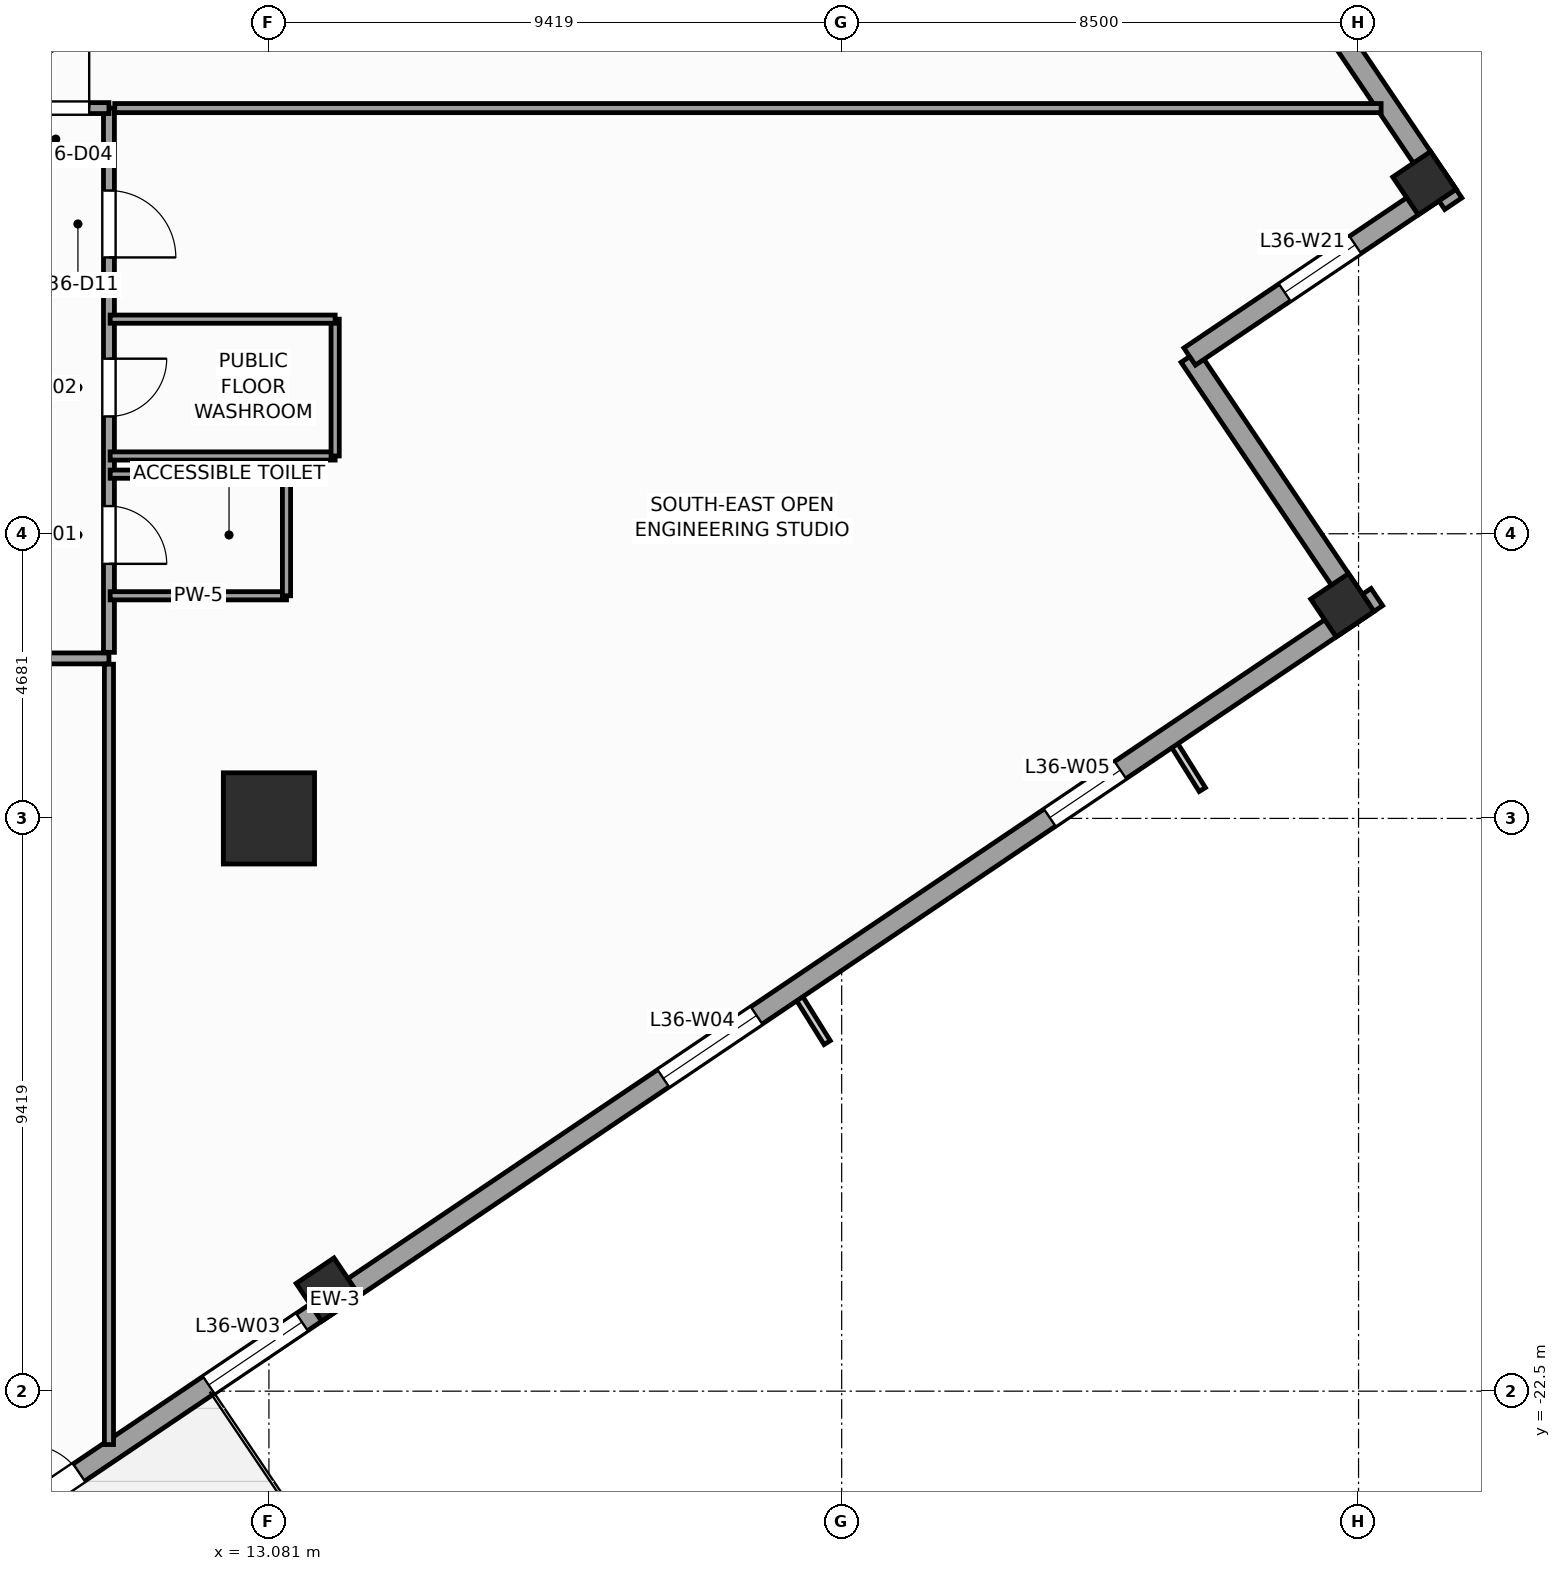
"""IFC4 building model, lengths in metres.
Left out: names, types, materials, properties, quantities, classifications, styles, units other than length and angle.
Written with IfcOpenShell. Run it as: python <this file> out.ifc"""

import sys

from ifc_helpers import new_model, si_unit, direction, frame, frame_2d, origin, origin_2d, place, context, subcontext, project, spatial, rectangle, extrude, source, transform, mapped, element, fill, save


model = new_model("IFC4")
c1 = context("Model", 3, precision=1e-05, world=origin(), true_north=direction((0.0, 1.0)))
c2 = subcontext(c1, "Body", "Model", "MODEL_VIEW")
j1 = project(units=[si_unit("LENGTHUNIT", "METRE"), si_unit("PLANEANGLEUNIT", "RADIAN")], contexts=[c1])
p1 = place(None, origin())
s1 = spatial("IfcSite", under=j1, at=p1, CompositionType="ELEMENT")
p2 = place(p1, origin())
s2 = spatial("IfcBuilding", under=s1, at=p2, CompositionType="ELEMENT")
p3 = place(p2, frame((0.0, 0.0, 152.4)))
s3 = spatial("IfcBuildingStorey", under=s2, at=p3, CompositionType="ELEMENT", Elevation=152.4)
m1 = source(origin(), c2, "Body", "SweptSolid", [
    extrude(rectangle(XDim=1.5, YDim=1.5, at=origin_2d()), origin(), (0.0, 0.0, 1.0), 4.0),
])
p4 = place(p3, frame((13.081, -13.081, 0.0), z_axis=(0.0, 0.0, 1.0), x_axis=(1.0, 0.0, 0.0)))
e1 = element("IfcColumn", 1, at=p4, inside=s3, PredefinedType="COLUMN", context=c2, shape_type="MappedRepresentation", body=[
    mapped(m1, transform((0.0, 0.0, 0.0), scale=1.0)),
])
m2 = source(origin(), c2, "Body", "SweptSolid", [
    extrude(rectangle(XDim=0.75, YDim=0.75, at=origin_2d()), origin(), (0.0, 0.0, 1.0), 4.0),
])
for number, where, z_axis, x_axis in (
    (2, (14.05, -20.83, 0.0), (0.0, 0.0, 1.0), (0.829, 0.559, 0.0)),
    (3, (30.734, -9.576, 0.0), (0.0, 0.0, 1.0), (0.829, 0.559, 0.0)),
    (4, (32.083, -2.635, 0.0), (0.0, 0.0, 1.0), (0.829, 0.559, 0.0)),
):
    element("IfcColumn", number, at=place(p3, frame(where, z_axis=z_axis, x_axis=x_axis)), inside=s3, PredefinedType="COLUMN", context=c2, shape_type="MappedRepresentation", body=[
        mapped(m2, transform((0.0, 0.0, 0.0), scale=1.0)),
    ])
p5 = place(p3, frame((-2.972, -32.558, 0.0), z_axis=(0.0, 0.0, 1.0), x_axis=(0.829036218961, 0.559194910251, 0.0)))
e5 = element("IfcWall", 5, at=p5, inside=s3, PredefinedType="STANDARD", context=c2, shape_type="SweptSolid", body=[
    extrude(rectangle(XDim=41.34, YDim=0.34, at=frame_2d((20.67, 0.0))), origin(), (0.0, 0.0, 1.0), 3.04),
])
p6 = place(p5, frame((14.545, 0.0, 0.0)))
e6 = element("IfcOpeningElement", 6, at=p6, cuts=e5, PredefinedType="OPENING", context=c2, shape_type="SweptSolid", body=[
    extrude(rectangle(XDim=1.05, YDim=2.25, at=frame_2d((0.525, 1.125))), frame((0.0, 0.18, 0.0), z_axis=(0.0, -1.0, 0.0), x_axis=(1.0, 0.0, 0.0)), (0.0, 0.0, 1.0), 0.36),
])
p7 = place(p5, frame((4.261, 0.0, 0.56)))
e7 = element("IfcOpeningElement", 7, at=p7, cuts=e5, PredefinedType="OPENING", context=c2, shape_type="SweptSolid", body=[
    extrude(rectangle(XDim=1.4, YDim=2.4, at=frame_2d((0.7, 1.2))), frame((0.0, 0.18, 0.0), z_axis=(0.0, -1.0, 0.0), x_axis=(1.0, 0.0, 0.0)), (0.0, 0.0, 1.0), 0.36),
])
p8 = place(p5, frame((11.064, 0.0, 0.61)))
e8 = element("IfcOpeningElement", 8, at=p8, cuts=e5, PredefinedType="OPENING", context=c2, shape_type="SweptSolid", body=[
    extrude(rectangle(XDim=1.85, YDim=2.35, at=frame_2d((0.925, 1.175))), frame((0.0, 0.18, 0.0), z_axis=(0.0, -1.0, 0.0), x_axis=(1.0, 0.0, 0.0)), (0.0, 0.0, 1.0), 0.36),
])
p9 = place(p5, frame((18.168, 0.0, 0.61)))
e9 = element("IfcOpeningElement", 9, at=p9, cuts=e5, PredefinedType="OPENING", context=c2, shape_type="SweptSolid", body=[
    extrude(rectangle(XDim=1.85, YDim=2.35, at=frame_2d((0.925, 1.175))), frame((0.0, 0.18, 0.0), z_axis=(0.0, -1.0, 0.0), x_axis=(1.0, 0.0, 0.0)), (0.0, 0.0, 1.0), 0.36),
])
p10 = place(p5, frame((27.186, 0.0, 0.61)))
e10 = element("IfcOpeningElement", 10, at=p10, cuts=e5, PredefinedType="OPENING", context=c2, shape_type="SweptSolid", body=[
    extrude(rectangle(XDim=1.85, YDim=2.35, at=frame_2d((0.925, 1.175))), frame((0.0, 0.18, 0.0), z_axis=(0.0, -1.0, 0.0), x_axis=(1.0, 0.0, 0.0)), (0.0, 0.0, 1.0), 0.36),
])
p11 = place(p5, frame((34.852, 0.0, 0.56)))
e11 = element("IfcOpeningElement", 11, at=p11, cuts=e5, PredefinedType="OPENING", context=c2, shape_type="SweptSolid", body=[
    extrude(rectangle(XDim=1.4, YDim=2.4, at=frame_2d((0.7, 1.2))), frame((0.0, 0.18, 0.0), z_axis=(0.0, -1.0, 0.0), x_axis=(1.0, 0.0, 0.0)), (0.0, 0.0, 1.0), 0.36),
])
p12 = place(p3, frame((31.019, -9.631, 0.0), z_axis=(0.0, 0.0, 1.0), x_axis=(-0.559210350234, 0.829025804298, 0.0)))
e12 = element("IfcWall", 12, at=p12, inside=s3, PredefinedType="STANDARD", context=c2, shape_type="SweptSolid", body=[
    extrude(rectangle(XDim=5.0, YDim=0.34, at=frame_2d((2.5, 0.0))), origin(), (0.0, 0.0, 1.0), 3.74),
])
p13 = place(p3, frame((28.223, -5.486, 0.0), z_axis=(0.0, 0.0, 1.0), x_axis=(0.82905227345, 0.559171107879, 0.0)))
e13 = element("IfcWall", 13, at=p13, inside=s3, PredefinedType="STANDARD", context=c2, shape_type="SweptSolid", body=[
    extrude(rectangle(XDim=5.17, YDim=0.34, at=frame_2d((2.585, 0.0))), origin(), (0.0, 0.0, 1.0), 3.04),
])
p14 = place(p13, frame((1.885, 0.0, 0.56)))
e14 = element("IfcOpeningElement", 14, at=p14, cuts=e13, PredefinedType="OPENING", context=c2, shape_type="SweptSolid", body=[
    extrude(rectangle(XDim=1.4, YDim=2.4, at=frame_2d((0.7, 1.2))), frame((0.0, 0.18, 0.0), z_axis=(0.0, -1.0, 0.0), x_axis=(1.0, 0.0, 0.0)), (0.0, 0.0, 1.0), 0.36),
])
p15 = place(p3, frame((32.558, -2.972, 0.0), z_axis=(0.0, 0.0, 1.0), x_axis=(-0.559194910251, 0.829036218961, 0.0)))
e15 = element("IfcWall", 15, at=p15, inside=s3, PredefinedType="STANDARD", context=c2, shape_type="SweptSolid", body=[
    extrude(rectangle(XDim=41.34, YDim=0.34, at=frame_2d((20.67, 0.0))), origin(), (0.0, 0.0, 1.0), 3.04),
])
p16 = place(p15, frame((4.261, 0.0, 0.56)))
e16 = element("IfcOpeningElement", 16, at=p16, cuts=e15, PredefinedType="OPENING", context=c2, shape_type="SweptSolid", body=[
    extrude(rectangle(XDim=1.4, YDim=2.4, at=frame_2d((0.7, 1.2))), frame((0.0, 0.18, 0.0), z_axis=(0.0, -1.0, 0.0), x_axis=(1.0, 0.0, 0.0)), (0.0, 0.0, 1.0), 0.36),
])
p17 = place(p15, frame((11.064, 0.0, 0.61)))
e17 = element("IfcOpeningElement", 17, at=p17, cuts=e15, PredefinedType="OPENING", context=c2, shape_type="SweptSolid", body=[
    extrude(rectangle(XDim=1.85, YDim=2.35, at=frame_2d((0.925, 1.175))), frame((0.0, 0.18, 0.0), z_axis=(0.0, -1.0, 0.0), x_axis=(1.0, 0.0, 0.0)), (0.0, 0.0, 1.0), 0.36),
])
p18 = place(p15, frame((18.168, 0.0, 0.61)))
e18 = element("IfcOpeningElement", 18, at=p18, cuts=e15, PredefinedType="OPENING", context=c2, shape_type="SweptSolid", body=[
    extrude(rectangle(XDim=1.85, YDim=2.35, at=frame_2d((0.925, 1.175))), frame((0.0, 0.18, 0.0), z_axis=(0.0, -1.0, 0.0), x_axis=(1.0, 0.0, 0.0)), (0.0, 0.0, 1.0), 0.36),
])
p19 = place(p15, frame((27.186, 0.0, 0.61)))
e19 = element("IfcOpeningElement", 19, at=p19, cuts=e15, PredefinedType="OPENING", context=c2, shape_type="SweptSolid", body=[
    extrude(rectangle(XDim=1.85, YDim=2.35, at=frame_2d((0.925, 1.175))), frame((0.0, 0.18, 0.0), z_axis=(0.0, -1.0, 0.0), x_axis=(1.0, 0.0, 0.0)), (0.0, 0.0, 1.0), 0.36),
])
p20 = place(p15, frame((34.852, 0.0, 0.56)))
e20 = element("IfcOpeningElement", 20, at=p20, cuts=e15, PredefinedType="OPENING", context=c2, shape_type="SweptSolid", body=[
    extrude(rectangle(XDim=1.4, YDim=2.4, at=frame_2d((0.7, 1.2))), frame((0.0, 0.18, 0.0), z_axis=(0.0, -1.0, 0.0), x_axis=(1.0, 0.0, 0.0)), (0.0, 0.0, 1.0), 0.36),
])
p21 = place(p3, frame((-10.45, -10.45, 0.0), z_axis=(0.0, 0.0, 1.0), x_axis=(1.0, 0.0, 0.0)))
e21 = element("IfcWall", 21, at=p21, inside=s3, PredefinedType="PARTITIONING", context=c2, shape_type="SweptSolid", body=[
    extrude(rectangle(XDim=20.9, YDim=0.18, at=frame_2d((10.45, 0.0))), origin(), (0.0, 0.0, 1.0), 3.74),
])
p22 = place(p21, frame((2.339, 0.0, 0.0)))
e22 = element("IfcOpeningElement", 22, at=p22, cuts=e21, PredefinedType="OPENING", context=c2, shape_type="SweptSolid", body=[
    extrude(rectangle(XDim=1.1, YDim=2.2, at=frame_2d((0.55, 1.1))), frame((0.0, 0.1, 0.0), z_axis=(0.0, -1.0, 0.0), x_axis=(1.0, 0.0, 0.0)), (0.0, 0.0, 1.0), 0.2),
])
p23 = place(p21, frame((7.4, 0.0, 0.0)))
e23 = element("IfcOpeningElement", 23, at=p23, cuts=e21, PredefinedType="OPENING", context=c2, shape_type="SweptSolid", body=[
    extrude(rectangle(XDim=1.1, YDim=2.2, at=frame_2d((0.55, 1.1))), frame((0.0, 0.1, 0.0), z_axis=(0.0, -1.0, 0.0), x_axis=(1.0, 0.0, 0.0)), (0.0, 0.0, 1.0), 0.2),
])
p24 = place(p21, frame((12.4, 0.0, 0.0)))
e24 = element("IfcOpeningElement", 24, at=p24, cuts=e21, PredefinedType="OPENING", context=c2, shape_type="SweptSolid", body=[
    extrude(rectangle(XDim=1.1, YDim=2.2, at=frame_2d((0.55, 1.1))), frame((0.0, 0.1, 0.0), z_axis=(0.0, -1.0, 0.0), x_axis=(1.0, 0.0, 0.0)), (0.0, 0.0, 1.0), 0.2),
])
p25 = place(p21, frame((17.46, 0.0, 0.0)))
e25 = element("IfcOpeningElement", 25, at=p25, cuts=e21, PredefinedType="OPENING", context=c2, shape_type="SweptSolid", body=[
    extrude(rectangle(XDim=1.1, YDim=2.2, at=frame_2d((0.55, 1.1))), frame((0.0, 0.1, 0.0), z_axis=(0.0, -1.0, 0.0), x_axis=(1.0, 0.0, 0.0)), (0.0, 0.0, 1.0), 0.2),
])
p26 = place(p3, frame((10.45, -10.35, 0.0), z_axis=(0.0, 0.0, 1.0), x_axis=(0.0, 1.0, 0.0)))
e26 = element("IfcWall", 26, at=p26, inside=s3, PredefinedType="PARTITIONING", context=c2, shape_type="SweptSolid", body=[
    extrude(rectangle(XDim=8.95, YDim=0.18, at=frame_2d((4.475, 0.0))), origin(), (0.0, 0.0, 1.0), 3.74),
])
p27 = place(p26, frame((1.455, 0.0, 0.0)))
e27 = element("IfcOpeningElement", 27, at=p27, cuts=e26, PredefinedType="OPENING", context=c2, shape_type="SweptSolid", body=[
    extrude(rectangle(XDim=0.95, YDim=2.1, at=frame_2d((0.475, 1.05))), frame((0.0, 0.1, 0.0), z_axis=(0.0, -1.0, 0.0), x_axis=(1.0, 0.0, 0.0)), (0.0, 0.0, 1.0), 0.2),
])
p28 = place(p26, frame((3.879, 0.0, 0.0)))
e28 = element("IfcOpeningElement", 28, at=p28, cuts=e26, PredefinedType="OPENING", context=c2, shape_type="SweptSolid", body=[
    extrude(rectangle(XDim=0.95, YDim=2.1, at=frame_2d((0.475, 1.05))), frame((0.0, 0.1, 0.0), z_axis=(0.0, -1.0, 0.0), x_axis=(1.0, 0.0, 0.0)), (0.0, 0.0, 1.0), 0.2),
])
p29 = place(p26, frame((6.494, 0.0, 0.0)))
e29 = element("IfcOpeningElement", 29, at=p29, cuts=e26, PredefinedType="OPENING", context=c2, shape_type="SweptSolid", body=[
    extrude(rectangle(XDim=1.1, YDim=2.2, at=frame_2d((0.55, 1.1))), frame((0.0, 0.1, 0.0), z_axis=(0.0, -1.0, 0.0), x_axis=(1.0, 0.0, 0.0)), (0.0, 0.0, 1.0), 0.2),
])
p30 = place(p3, frame((8.7, -1.4, 0.0), z_axis=(0.0, 0.0, 1.0), x_axis=(1.0, 0.0, 0.0)))
e30 = element("IfcWall", 30, at=p30, inside=s3, PredefinedType="PARTITIONING", context=c2, shape_type="SweptSolid", body=[
    extrude(rectangle(XDim=1.75, YDim=0.18, at=frame_2d((0.875, 0.0))), origin(), (0.0, 0.0, 1.0), 3.74),
])
p31 = place(p30, frame((0.325, 0.0, 0.0)))
e31 = element("IfcOpeningElement", 31, at=p31, cuts=e30, PredefinedType="OPENING", context=c2, shape_type="SweptSolid", body=[
    extrude(rectangle(XDim=1.1, YDim=2.2, at=frame_2d((0.55, 1.1))), frame((0.0, 0.1, 0.0), z_axis=(0.0, -1.0, 0.0), x_axis=(1.0, 0.0, 0.0)), (0.0, 0.0, 1.0), 0.2),
])
p32 = place(p3, frame((10.545, -1.4, 0.0), z_axis=(0.0, 0.0, 1.0), x_axis=(1.0, 0.0, 0.0)))
e32 = element("IfcWall", 32, at=p32, inside=s3, PredefinedType="PARTITIONING", context=c2, shape_type="SweptSolid", body=[
    extrude(rectangle(XDim=20.826, YDim=0.15, at=frame_2d((10.413, 0.0))), origin(), (0.0, 0.0, 1.0), 3.74),
])
p33 = place(p3, frame((10.45, -23.378, 0.0), z_axis=(0.0, 0.0, 1.0), x_axis=(0.0, 1.0, 0.0)))
e33 = element("IfcWall", 33, at=p33, inside=s3, PredefinedType="PARTITIONING", context=c2, shape_type="SweptSolid", body=[
    extrude(rectangle(XDim=12.833, YDim=0.15, at=frame_2d((6.417, 0.0))), origin(), (0.0, 0.0, 1.0), 3.74),
])
p34 = place(p3, frame((10.47, -9.42, 0.0), z_axis=(0.0, 0.0, 1.0), x_axis=(1.0, 0.0, 0.0)))
e34 = element("IfcWall", 34, at=p34, inside=s3, PredefinedType="PARTITIONING", context=c2, shape_type="SweptSolid", body=[
    extrude(rectangle(XDim=2.9, YDim=0.135, at=frame_2d((1.45, 0.0))), origin(), (0.0, 0.0, 1.0), 3.74),
])
p35 = place(p3, frame((13.37, -9.42, 0.0), z_axis=(0.0, 0.0, 1.0), x_axis=(0.0, 1.0, 0.0)))
e35 = element("IfcWall", 35, at=p35, inside=s3, PredefinedType="PARTITIONING", context=c2, shape_type="SweptSolid", body=[
    extrude(rectangle(XDim=2.0, YDim=0.135, at=frame_2d((1.0, 0.0))), origin(), (0.0, 0.0, 1.0), 2.84),
])
p36 = place(p3, frame((10.47, -7.42, 0.0), z_axis=(0.0, 0.0, 1.0), x_axis=(1.0, 0.0, 0.0)))
e36 = element("IfcWall", 36, at=p36, inside=s3, PredefinedType="PARTITIONING", context=c2, shape_type="SweptSolid", body=[
    extrude(rectangle(XDim=2.9, YDim=0.135, at=frame_2d((1.45, 0.0))), origin(), (0.0, 0.0, 1.0), 3.74),
])
p37 = place(p3, frame((10.47, -7.121, 0.0), z_axis=(0.0, 0.0, 1.0), x_axis=(1.0, 0.0, 0.0)))
e37 = element("IfcWall", 37, at=p37, inside=s3, PredefinedType="PARTITIONING", context=c2, shape_type="SweptSolid", body=[
    extrude(rectangle(XDim=3.7, YDim=0.135, at=frame_2d((1.85, 0.0))), origin(), (0.0, 0.0, 1.0), 3.74),
])
p38 = place(p3, frame((14.17, -7.121, 0.0), z_axis=(0.0, 0.0, 1.0), x_axis=(0.0, 1.0, 0.0)))
e38 = element("IfcWall", 38, at=p38, inside=s3, PredefinedType="PARTITIONING", context=c2, shape_type="SweptSolid", body=[
    extrude(rectangle(XDim=2.25, YDim=0.135, at=frame_2d((1.125, 0.0))), origin(), (0.0, 0.0, 1.0), 3.74),
])
p39 = place(p3, frame((10.47, -4.871, 0.0), z_axis=(0.0, 0.0, 1.0), x_axis=(1.0, 0.0, 0.0)))
e39 = element("IfcWall", 39, at=p39, inside=s3, PredefinedType="PARTITIONING", context=c2, shape_type="SweptSolid", body=[
    extrude(rectangle(XDim=3.7, YDim=0.135, at=frame_2d((1.85, 0.0))), origin(), (0.0, 0.0, 1.0), 3.74),
])
m3 = source(origin(), c2, "Body", "SweptSolid", [
    extrude(rectangle(XDim=1.05, YDim=2.25, at=frame_2d((0.525, 1.125))), frame((0.0, 0.025, 0.0), z_axis=(0.0, -1.0, 0.0), x_axis=(1.0, 0.0, 0.0)), (0.0, 0.0, 1.0), 0.05),
])
p40 = place(p6, origin())
e40 = element("IfcDoor", 40, at=p40, inside=s3, OperationType="SINGLE_SWING_LEFT", PredefinedType="DOOR", context=c2, shape_type="MappedRepresentation", body=[
    mapped(m3, transform((0.0, 0.0, 0.0), scale=1.0)),
])
fill(e6, e40)
m4 = source(origin(), c2, "Body", "SweptSolid", [
    extrude(rectangle(XDim=1.85, YDim=2.35, at=frame_2d((0.925, 1.175))), frame((0.0, 0.03, 0.0), z_axis=(0.0, -1.0, 0.0), x_axis=(1.0, 0.0, 0.0)), (0.0, 0.0, 1.0), 0.06),
])
p41 = place(p9, origin())
e41 = element("IfcWindow", 41, at=p41, inside=s3, PartitioningType="SINGLE_PANEL", PredefinedType="WINDOW", context=c2, shape_type="MappedRepresentation", body=[
    mapped(m4, transform((0.0, 0.0, 0.0), scale=1.0)),
])
fill(e9, e41)
p42 = place(p10, origin())
e42 = element("IfcWindow", 42, at=p42, inside=s3, PartitioningType="SINGLE_PANEL", PredefinedType="WINDOW", context=c2, shape_type="MappedRepresentation", body=[
    mapped(m4, transform((0.0, 0.0, 0.0), scale=1.0)),
])
fill(e10, e42)
m5 = source(origin(), c2, "Body", "SweptSolid", [
    extrude(rectangle(XDim=1.4, YDim=2.4, at=frame_2d((0.7, 1.2))), frame((0.0, 0.03, 0.0), z_axis=(0.0, -1.0, 0.0), x_axis=(1.0, 0.0, 0.0)), (0.0, 0.0, 1.0), 0.06),
])
p43 = place(p11, origin())
e43 = element("IfcWindow", 43, at=p43, inside=s3, PartitioningType="SINGLE_PANEL", PredefinedType="WINDOW", context=c2, shape_type="MappedRepresentation", body=[
    mapped(m5, transform((0.0, 0.0, 0.0), scale=1.0)),
])
fill(e11, e43)
p44 = place(p14, origin())
e44 = element("IfcWindow", 44, at=p44, inside=s3, PartitioningType="SINGLE_PANEL", PredefinedType="WINDOW", context=c2, shape_type="MappedRepresentation", body=[
    mapped(m5, transform((0.0, 0.0, 0.0), scale=1.0)),
])
fill(e14, e44)
m6 = source(origin(), c2, "Body", "SweptSolid", [
    extrude(rectangle(XDim=0.95, YDim=2.1, at=frame_2d((0.475, 1.05))), frame((0.0, 0.025, 0.0), z_axis=(0.0, -1.0, 0.0), x_axis=(1.0, 0.0, 0.0)), (0.0, 0.0, 1.0), 0.05),
])
p45 = place(p27, frame((0.95, 0.0, 0.0), z_axis=(0.0, 0.0, 1.0), x_axis=(-1.0, 0.0, 0.0)))
e45 = element("IfcDoor", 45, at=p45, inside=s3, OperationType="SINGLE_SWING_LEFT", PredefinedType="DOOR", context=c2, shape_type="MappedRepresentation", body=[
    mapped(m6, transform((0.0, 0.0, 0.0), scale=1.0)),
])
fill(e27, e45)
p46 = place(p28, frame((0.95, 0.0, 0.0), z_axis=(0.0, 0.0, 1.0), x_axis=(-1.0, 0.0, 0.0)))
e46 = element("IfcDoor", 46, at=p46, inside=s3, OperationType="SINGLE_SWING_RIGHT", PredefinedType="DOOR", context=c2, shape_type="MappedRepresentation", body=[
    mapped(m6, transform((0.0, 0.0, 0.0), scale=1.0)),
])
fill(e28, e46)
m7 = source(origin(), c2, "Body", "SweptSolid", [
    extrude(rectangle(XDim=1.1, YDim=2.2, at=frame_2d((0.55, 1.1))), frame((0.0, 0.025, 0.0), z_axis=(0.0, -1.0, 0.0), x_axis=(1.0, 0.0, 0.0)), (0.0, 0.0, 1.0), 0.05),
])
p47 = place(p31, origin())
e47 = element("IfcDoor", 47, at=p47, inside=s3, OperationType="SINGLE_SWING_RIGHT", PredefinedType="DOOR", context=c2, shape_type="MappedRepresentation", body=[
    mapped(m7, transform((0.0, 0.0, 0.0), scale=1.0)),
])
fill(e31, e47)
p48 = place(p29, frame((1.1, 0.0, 0.0), z_axis=(0.0, 0.0, 1.0), x_axis=(-1.0, 0.0, 0.0)))
e48 = element("IfcDoor", 48, at=p48, inside=s3, OperationType="SINGLE_SWING_LEFT", PredefinedType="DOOR", context=c2, shape_type="MappedRepresentation", body=[
    mapped(m7, transform((0.0, 0.0, 0.0), scale=1.0)),
])
fill(e29, e48)
save(model, sys.argv[1])
